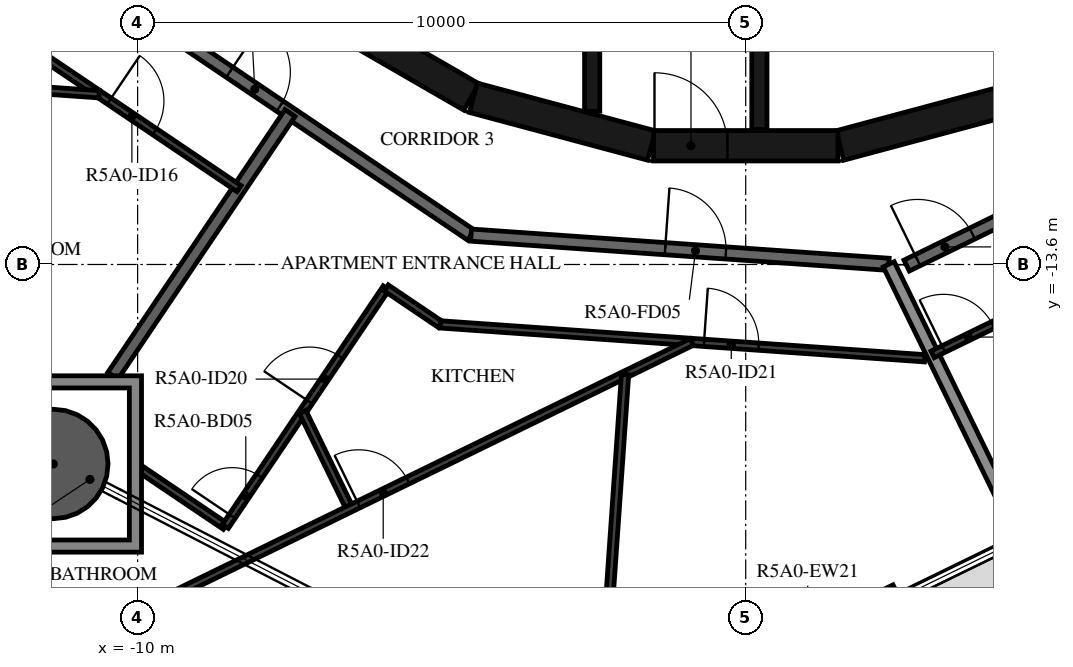
"""IFC4 building model, lengths in metres.
Left out: names, types, materials, properties, quantities, classifications, styles, units other than length and angle.
Written with IfcOpenShell. Run it as: python <this file> out.ifc"""

import sys

from ifc_helpers import new_model, si_unit, direction, frame, frame_2d, origin, origin_2d, place, context, subcontext, project, spatial, polyline, rectangle, hollow_circle, outline, extrude, element, fill, save


model = new_model("IFC4")
c1 = context("Model", 3, precision=1e-05, world=origin(), true_north=direction((0.0, 1.0)))
c2 = subcontext(c1, "Body", "Model", "MODEL_VIEW")
j1 = project(units=[si_unit("LENGTHUNIT", "METRE"), si_unit("PLANEANGLEUNIT", "RADIAN")], contexts=[c1])
p1 = place(None, origin())
s1 = spatial("IfcSite", under=j1, at=p1, CompositionType="ELEMENT")
p2 = place(p1, origin())
s2 = spatial("IfcBuilding", under=s1, at=p2, CompositionType="ELEMENT")
p3 = place(p2, frame((0.0, 0.0, 195.4)))
s3 = spatial("IfcBuildingStorey", under=s2, at=p3, CompositionType="ELEMENT", Elevation=195.4)
p4 = place(p3, frame((-11.386, -16.881, -0.38), z_axis=(0.0, 0.0, 1.0), x_axis=(1.0, 0.0, 0.0)))
e1 = element("IfcColumn", 1, at=p4, inside=s3, PredefinedType="COLUMN", context=c2, shape_type="SweptSolid", body=[
    extrude(hollow_circle(Radius=0.9, WallThickness=0.04, at=origin_2d()), origin(), (0.0, 0.0, 1.0), 3.5),
])
p5 = place(p3, frame((-0.418, -20.343, 0.0), z_axis=(0.0, 0.0, 1.0), x_axis=(0.898778711213, 0.43840258698, 0.0)))
e2 = element("IfcWall", 2, at=p5, inside=s3, PredefinedType="STANDARD", context=c2, shape_type="SweptSolid", body=[
    extrude(rectangle(XDim=3.2, YDim=0.16, at=frame_2d((1.6, 0.0))), origin(), (0.0, 0.0, 1.0), 3.12),
])
p6 = place(p5, frame((0.4, 0.0, 0.0)))
e3 = element("IfcOpeningElement", 3, at=p6, cuts=e2, PredefinedType="OPENING", context=c2, shape_type="SweptSolid", body=[
    extrude(rectangle(XDim=2.4, YDim=2.4, at=frame_2d((1.2, 1.2))), frame((0.0, 0.09, 0.0), z_axis=(0.0, -1.0, 0.0), x_axis=(1.0, 0.0, 0.0)), (0.0, 0.0, 1.0), 0.18),
])
for number, where, z_axis, x_axis in (
    (4, (1.55, -11.643, 0.0), (0.0, 0.0, 1.0), (0.966, 0.259, 0.0)),
    (5, (-7.137, -9.329, 0.0), (0.0, 0.0, 1.0), (0.866, -0.5, 0.0)),
    (6, (-4.479, -10.858, 0.0), (0.0, 0.0, 1.0), (0.966, -0.259, 0.0)),
):
    element("IfcWall", number, at=place(p3, frame(where, z_axis=z_axis, x_axis=x_axis)), inside=s3, PredefinedType="SHEAR", context=c2, shape_type="SweptSolid", body=[
        extrude(rectangle(XDim=3.033, YDim=0.5, at=frame_2d((1.516, 0.0))), origin(), (0.0, 0.0, 1.0), 3.12),
    ])
p7 = place(p3, frame((-1.516, -11.647, 0.0), z_axis=(0.0, 0.0, 1.0), x_axis=(1.0, 0.0, 0.0)))
e7 = element("IfcWall", 7, at=p7, inside=s3, PredefinedType="SHEAR", context=c2, shape_type="SweptSolid", body=[
    extrude(rectangle(XDim=3.033, YDim=0.5, at=frame_2d((1.516, 0.0))), origin(), (0.0, 0.0, 1.0), 3.12),
])
p8 = place(p7, frame((0.016, 0.0, 0.0)))
e8 = element("IfcOpeningElement", 8, at=p8, cuts=e7, PredefinedType="OPENING", context=c2, shape_type="SweptSolid", body=[
    extrude(rectangle(XDim=1.2, YDim=2.1, at=frame_2d((0.6, 1.05))), frame((0.0, 0.26, 0.0), z_axis=(0.0, -1.0, 0.0), x_axis=(1.0, 0.0, 0.0)), (0.0, 0.0, 1.0), 0.52),
])
p9 = place(p3, frame((-2.525, -8.97, 0.0), z_axis=(0.0, 0.0, 1.0), x_axis=(0.0, -1.0, 0.0)))
e9 = element("IfcWall", 9, at=p9, inside=s3, PredefinedType="SHEAR", context=c2, shape_type="SweptSolid", body=[
    extrude(rectangle(XDim=2.11, YDim=0.25, at=frame_2d((1.055, 0.0))), origin(), (0.0, 0.0, 1.0), 3.12),
])
p10 = place(p3, frame((0.225, -8.97, 0.0), z_axis=(0.0, 0.0, 1.0), x_axis=(0.0, -1.0, 0.0)))
e10 = element("IfcWall", 10, at=p10, inside=s3, PredefinedType="SHEAR", context=c2, shape_type="SweptSolid", body=[
    extrude(rectangle(XDim=2.41, YDim=0.25, at=frame_2d((1.205, 0.0))), origin(), (0.0, 0.0, 1.0), 3.12),
])
p11 = place(p3, frame((-10.47, -9.101, 0.0), z_axis=(0.0, 0.0, 1.0), x_axis=(0.829035841718, -0.559195469534, 0.0)))
e11 = element("IfcWall", 11, at=p11, inside=s3, PredefinedType="STANDARD", context=c2, shape_type="SweptSolid", body=[
    extrude(rectangle(XDim=7.181, YDim=0.2, at=frame_2d((3.591, 0.0))), origin(), (0.0, 0.0, 1.0), 3.12),
])
p12 = place(p11, frame((2.39, 0.0, 0.0)))
e12 = element("IfcOpeningElement", 12, at=p12, cuts=e11, PredefinedType="OPENING", context=c2, shape_type="SweptSolid", body=[
    extrude(rectangle(XDim=1.0, YDim=2.1, at=frame_2d((0.5, 1.05))), frame((0.0, 0.11, 0.0), z_axis=(0.0, -1.0, 0.0), x_axis=(1.0, 0.0, 0.0)), (0.0, 0.0, 1.0), 0.22),
])
p13 = place(p3, frame((-4.517, -13.117, 0.0), z_axis=(0.0, 0.0, 1.0), x_axis=(0.997564669554, -0.069747616856, 0.0)))
e13 = element("IfcWall", 13, at=p13, inside=s3, PredefinedType="STANDARD", context=c2, shape_type="SweptSolid", body=[
    extrude(rectangle(XDim=6.885, YDim=0.2, at=frame_2d((3.443, 0.0))), origin(), (0.0, 0.0, 1.0), 3.12),
])
p14 = place(p13, frame((3.2, 0.0, 0.0)))
e14 = element("IfcOpeningElement", 14, at=p14, cuts=e13, PredefinedType="OPENING", context=c2, shape_type="SweptSolid", body=[
    extrude(rectangle(XDim=1.0, YDim=2.1, at=frame_2d((0.5, 1.05))), frame((0.0, 0.11, 0.0), z_axis=(0.0, -1.0, 0.0), x_axis=(1.0, 0.0, 0.0)), (0.0, 0.0, 1.0), 0.22),
])
p15 = place(p3, frame((2.647, -13.618, 0.0), z_axis=(0.0, 0.0, 1.0), x_axis=(0.898796543751, 0.438366026218, 0.0)))
e15 = element("IfcWall", 15, at=p15, inside=s3, PredefinedType="STANDARD", context=c2, shape_type="SweptSolid", body=[
    extrude(rectangle(XDim=7.181, YDim=0.2, at=frame_2d((3.591, 0.0))), origin(), (0.0, 0.0, 1.0), 3.12),
])
p16 = place(p15, frame((0.2, 0.0, 0.0)))
e16 = element("IfcOpeningElement", 16, at=p16, cuts=e15, PredefinedType="OPENING", context=c2, shape_type="SweptSolid", body=[
    extrude(rectangle(XDim=1.0, YDim=2.1, at=frame_2d((0.5, 1.05))), frame((0.0, 0.11, 0.0), z_axis=(0.0, -1.0, 0.0), x_axis=(1.0, 0.0, 0.0)), (0.0, 0.0, 1.0), 0.22),
])
p17 = place(p3, frame((-10.407, -15.43, 0.0), z_axis=(0.0, 0.0, 1.0), x_axis=(0.559038328133, 0.829141813973, 0.0)))
e17 = element("IfcWall", 17, at=p17, inside=s3, PredefinedType="STANDARD", context=c2, shape_type="SweptSolid", body=[
    extrude(rectangle(XDim=5.212, YDim=0.2, at=frame_2d((2.606, 0.0))), origin(), (0.0, 0.0, 1.0), 3.12),
])
p18 = place(p3, frame((4.512, -18.027, 0.0), z_axis=(0.0, 0.0, 1.0), x_axis=(-0.438374835386, 0.898792247241, 0.0)))
e18 = element("IfcWall", 18, at=p18, inside=s3, PredefinedType="STANDARD", context=c2, shape_type="SweptSolid", body=[
    extrude(rectangle(XDim=4.929, YDim=0.2, at=frame_2d((2.464, 0.0))), origin(), (0.0, 0.0, 1.0), 2.73),
])
p19 = place(p3, frame((-11.642, -10.12, 0.0), z_axis=(0.0, 0.0, 1.0), x_axis=(0.829018066952, -0.559221820629, 0.0)))
e19 = element("IfcWall", 19, at=p19, inside=s3, PredefinedType="PARTITIONING", context=c2, shape_type="SweptSolid", body=[
    extrude(rectangle(XDim=3.992, YDim=0.12, at=frame_2d((1.996, 0.0))), origin(), (0.0, 0.0, 1.0), 3.12),
])
p20 = place(p19, frame((1.417, 0.0, 0.0)))
e20 = element("IfcOpeningElement", 20, at=p20, cuts=e19, PredefinedType="OPENING", context=c2, shape_type="SweptSolid", body=[
    extrude(rectangle(XDim=0.9, YDim=2.1, at=frame_2d((0.45, 1.05))), frame((0.0, 0.07, 0.0), z_axis=(0.0, -1.0, 0.0), x_axis=(1.0, 0.0, 0.0)), (0.0, 0.0, 1.0), 0.14),
])
p21 = place(p3, frame((-14.551, -10.527, 0.0), z_axis=(0.0, 0.0, 1.0), x_axis=(0.997564247633, -0.069753651118, 0.0)))
e21 = element("IfcWall", 21, at=p21, inside=s3, PredefinedType="PARTITIONING", context=c2, shape_type="SweptSolid", body=[
    extrude(rectangle(XDim=3.927, YDim=0.12, at=frame_2d((1.963, 0.0))), origin(), (0.0, 0.0, 1.0), 3.12),
])
p22 = place(p3, frame((-9.936, -16.976, 0.0), z_axis=(0.0, 0.0, 1.0), x_axis=(0.829057888835, -0.559162782167, 0.0)))
e22 = element("IfcWall", 22, at=p22, inside=s3, PredefinedType="PARTITIONING", context=c2, shape_type="SweptSolid", body=[
    extrude(rectangle(XDim=1.664, YDim=0.12, at=frame_2d((0.832, 0.0))), origin(), (0.0, 0.0, 1.0), 3.12),
])
p23 = place(p3, frame((-8.557, -17.906, 0.0), z_axis=(0.0, 0.0, 1.0), x_axis=(0.559194471553, 0.829036514868, 0.0)))
e23 = element("IfcWall", 23, at=p23, inside=s3, PredefinedType="PARTITIONING", context=c2, shape_type="SweptSolid", body=[
    extrude(rectangle(XDim=4.73, YDim=0.12, at=frame_2d((2.365, 0.0))), origin(), (0.0, 0.0, 1.0), 3.12),
])
p24 = place(p23, frame((0.2, 0.0, 0.0)))
e24 = element("IfcOpeningElement", 24, at=p24, cuts=e23, PredefinedType="OPENING", context=c2, shape_type="SweptSolid", body=[
    extrude(rectangle(XDim=0.8, YDim=2.1, at=frame_2d((0.4, 1.05))), frame((0.0, 0.07, 0.0), z_axis=(0.0, -1.0, 0.0), x_axis=(1.0, 0.0, 0.0)), (0.0, 0.0, 1.0), 0.14),
])
p25 = place(p23, frame((2.471, 0.0, 0.0)))
e25 = element("IfcOpeningElement", 25, at=p25, cuts=e23, PredefinedType="OPENING", context=c2, shape_type="SweptSolid", body=[
    extrude(rectangle(XDim=0.9, YDim=2.1, at=frame_2d((0.45, 1.05))), frame((0.0, 0.07, 0.0), z_axis=(0.0, -1.0, 0.0), x_axis=(1.0, 0.0, 0.0)), (0.0, 0.0, 1.0), 0.14),
])
p26 = place(p3, frame((-5.912, -13.985, 0.0), z_axis=(0.0, 0.0, 1.0), x_axis=(0.829027978444, -0.559207127062, 0.0)))
e26 = element("IfcWall", 26, at=p26, inside=s3, PredefinedType="PARTITIONING", context=c2, shape_type="SweptSolid", body=[
    extrude(rectangle(XDim=1.073, YDim=0.12, at=frame_2d((0.537, 0.0))), origin(), (0.0, 0.0, 1.0), 3.12),
])
p27 = place(p3, frame((-5.022, -14.585, 0.0), z_axis=(0.0, 0.0, 1.0), x_axis=(0.997565118395, -0.069741197017, 0.0)))
e27 = element("IfcWall", 27, at=p27, inside=s3, PredefinedType="PARTITIONING", context=c2, shape_type="SweptSolid", body=[
    extrude(rectangle(XDim=7.985, YDim=0.12, at=frame_2d((3.993, 0.0))), origin(), (0.0, 0.0, 1.0), 3.12),
])
p28 = place(p27, frame((4.346, 0.0, 0.0)))
e28 = element("IfcOpeningElement", 28, at=p28, cuts=e27, PredefinedType="OPENING", context=c2, shape_type="SweptSolid", body=[
    extrude(rectangle(XDim=0.9, YDim=2.1, at=frame_2d((0.45, 1.05))), frame((0.0, 0.07, 0.0), z_axis=(0.0, -1.0, 0.0), x_axis=(1.0, 0.0, 0.0)), (0.0, 0.0, 1.0), 0.14),
])
p29 = place(p3, frame((-6.51, -17.617, 0.0), z_axis=(0.0, 0.0, 1.0), x_axis=(-0.438380229518, 0.898789616299, 0.0)))
e29 = element("IfcWall", 29, at=p29, inside=s3, PredefinedType="PARTITIONING", context=c2, shape_type="SweptSolid", body=[
    extrude(rectangle(XDim=1.773, YDim=0.12, at=frame_2d((0.887, 0.0))), origin(), (0.0, 0.0, 1.0), 3.12),
])
p30 = place(p3, frame((-9.886, -19.264, 0.0), z_axis=(0.0, 0.0, 1.0), x_axis=(0.898796326112, 0.43836647245, 0.0)))
e30 = element("IfcWall", 30, at=p30, inside=s3, PredefinedType="PARTITIONING", context=c2, shape_type="SweptSolid", body=[
    extrude(rectangle(XDim=10.014, YDim=0.12, at=frame_2d((5.007, 0.0))), origin(), (0.0, 0.0, 1.0), 3.12),
])
p31 = place(p30, frame((3.917, 0.0, 0.0)))
e31 = element("IfcOpeningElement", 31, at=p31, cuts=e30, PredefinedType="OPENING", context=c2, shape_type="SweptSolid", body=[
    extrude(rectangle(XDim=0.9, YDim=2.1, at=frame_2d((0.45, 1.05))), frame((0.0, 0.07, 0.0), z_axis=(0.0, -1.0, 0.0), x_axis=(1.0, 0.0, 0.0)), (0.0, 0.0, 1.0), 0.14),
])
p32 = place(p3, frame((-2.403, -21.4, 0.0), z_axis=(0.0, 0.0, 1.0), x_axis=(0.069729998801, 0.997565901215, 0.0)))
e32 = element("IfcWall", 32, at=p32, inside=s3, PredefinedType="PARTITIONING", context=c2, shape_type="SweptSolid", body=[
    extrude(rectangle(XDim=6.005, YDim=0.12, at=frame_2d((3.002, 0.0))), origin(), (0.0, 0.0, 1.0), 3.12),
])
p33 = place(p3, frame((3.074, -15.078, 0.0), z_axis=(0.0, 0.0, 1.0), x_axis=(0.898800770739, 0.438357359377, 0.0)))
e33 = element("IfcWall", 33, at=p33, inside=s3, PredefinedType="PARTITIONING", context=c2, shape_type="SweptSolid", body=[
    extrude(rectangle(XDim=7.694, YDim=0.12, at=frame_2d((3.847, 0.0))), origin(), (0.0, 0.0, 1.0), 3.12),
])
p34 = place(p33, frame((0.2, 0.0, 0.0)))
e34 = element("IfcOpeningElement", 34, at=p34, cuts=e33, PredefinedType="OPENING", context=c2, shape_type="SweptSolid", body=[
    extrude(rectangle(XDim=0.9, YDim=2.1, at=frame_2d((0.45, 1.05))), frame((0.0, 0.07, 0.0), z_axis=(0.0, -1.0, 0.0), x_axis=(1.0, 0.0, 0.0)), (0.0, 0.0, 1.0), 0.14),
])
p35 = place(p3, origin())
e35 = element("IfcWall", 35, at=p35, inside=s3, PredefinedType="STANDARD", context=c2, shape_type="SweptSolid", body=[
    extrude(outline(polyline([(-9.936, -15.43), (-9.936, -18.331), (-12.836, -18.331), (-12.836, -15.43), (-9.936, -15.43)]), holes=[polyline([(-12.636, -18.131), (-10.136, -18.131), (-10.136, -15.631), (-12.636, -15.631), (-12.636, -18.131)])]), origin(), (0.0, 0.0, 1.0), 3.12),
])
p36 = place(p8, origin())
e36 = element("IfcDoor", 36, at=p36, inside=s3, OperationType="SINGLE_SWING_RIGHT", PredefinedType="DOOR", context=c2, shape_type="SweptSolid", body=[
    extrude(rectangle(XDim=1.2, YDim=2.1, at=frame_2d((0.6, 1.05))), frame((0.0, 0.025, 0.0), z_axis=(0.0, -1.0, 0.0), x_axis=(1.0, 0.0, 0.0)), (0.0, 0.0, 1.0), 0.05),
])
fill(e8, e36)
p37 = place(p12, origin())
e37 = element("IfcDoor", 37, at=p37, inside=s3, OperationType="SINGLE_SWING_RIGHT", PredefinedType="DOOR", context=c2, shape_type="SweptSolid", body=[
    extrude(rectangle(XDim=1.0, YDim=2.1, at=frame_2d((0.5, 1.05))), frame((0.0, 0.025, 0.0), z_axis=(0.0, -1.0, 0.0), x_axis=(1.0, 0.0, 0.0)), (0.0, 0.0, 1.0), 0.05),
])
fill(e12, e37)
p38 = place(p20, origin())
e38 = element("IfcDoor", 38, at=p38, inside=s3, OperationType="SINGLE_SWING_RIGHT", PredefinedType="DOOR", context=c2, shape_type="SweptSolid", body=[
    extrude(rectangle(XDim=0.9, YDim=2.1, at=frame_2d((0.45, 1.05))), frame((0.0, 0.025, 0.0), z_axis=(0.0, -1.0, 0.0), x_axis=(1.0, 0.0, 0.0)), (0.0, 0.0, 1.0), 0.05),
])
fill(e20, e38)
p39 = place(p14, origin())
e39 = element("IfcDoor", 39, at=p39, inside=s3, OperationType="SINGLE_SWING_LEFT", PredefinedType="DOOR", context=c2, shape_type="SweptSolid", body=[
    extrude(rectangle(XDim=1.0, YDim=2.1, at=frame_2d((0.5, 1.05))), frame((0.0, 0.025, 0.0), z_axis=(0.0, -1.0, 0.0), x_axis=(1.0, 0.0, 0.0)), (0.0, 0.0, 1.0), 0.05),
])
fill(e14, e39)
p40 = place(p24, origin())
e40 = element("IfcDoor", 40, at=p40, inside=s3, OperationType="SINGLE_SWING_LEFT", PredefinedType="DOOR", context=c2, shape_type="SweptSolid", body=[
    extrude(rectangle(XDim=0.8, YDim=2.1, at=frame_2d((0.4, 1.05))), frame((0.0, 0.025, 0.0), z_axis=(0.0, -1.0, 0.0), x_axis=(1.0, 0.0, 0.0)), (0.0, 0.0, 1.0), 0.05),
])
fill(e24, e40)
p41 = place(p25, origin())
e41 = element("IfcDoor", 41, at=p41, inside=s3, OperationType="SINGLE_SWING_LEFT", PredefinedType="DOOR", context=c2, shape_type="SweptSolid", body=[
    extrude(rectangle(XDim=0.9, YDim=2.1, at=frame_2d((0.45, 1.05))), frame((0.0, 0.025, 0.0), z_axis=(0.0, -1.0, 0.0), x_axis=(1.0, 0.0, 0.0)), (0.0, 0.0, 1.0), 0.05),
])
fill(e25, e41)
p42 = place(p28, origin())
e42 = element("IfcDoor", 42, at=p42, inside=s3, OperationType="SINGLE_SWING_LEFT", PredefinedType="DOOR", context=c2, shape_type="SweptSolid", body=[
    extrude(rectangle(XDim=0.9, YDim=2.1, at=frame_2d((0.45, 1.05))), frame((0.0, 0.025, 0.0), z_axis=(0.0, -1.0, 0.0), x_axis=(1.0, 0.0, 0.0)), (0.0, 0.0, 1.0), 0.05),
])
fill(e28, e42)
p43 = place(p31, origin())
e43 = element("IfcDoor", 43, at=p43, inside=s3, OperationType="SINGLE_SWING_LEFT", PredefinedType="DOOR", context=c2, shape_type="SweptSolid", body=[
    extrude(rectangle(XDim=0.9, YDim=2.1, at=frame_2d((0.45, 1.05))), frame((0.0, 0.025, 0.0), z_axis=(0.0, -1.0, 0.0), x_axis=(1.0, 0.0, 0.0)), (0.0, 0.0, 1.0), 0.05),
])
fill(e31, e43)
p44 = place(p16, origin())
e44 = element("IfcDoor", 44, at=p44, inside=s3, OperationType="SINGLE_SWING_LEFT", PredefinedType="DOOR", context=c2, shape_type="SweptSolid", body=[
    extrude(rectangle(XDim=1.0, YDim=2.1, at=frame_2d((0.5, 1.05))), frame((0.0, 0.025, 0.0), z_axis=(0.0, -1.0, 0.0), x_axis=(1.0, 0.0, 0.0)), (0.0, 0.0, 1.0), 0.05),
])
fill(e16, e44)
p45 = place(p34, origin())
e45 = element("IfcDoor", 45, at=p45, inside=s3, OperationType="SINGLE_SWING_LEFT", PredefinedType="DOOR", context=c2, shape_type="SweptSolid", body=[
    extrude(rectangle(XDim=0.9, YDim=2.1, at=frame_2d((0.45, 1.05))), frame((0.0, 0.025, 0.0), z_axis=(0.0, -1.0, 0.0), x_axis=(1.0, 0.0, 0.0)), (0.0, 0.0, 1.0), 0.05),
])
fill(e34, e45)
save(model, sys.argv[1])
